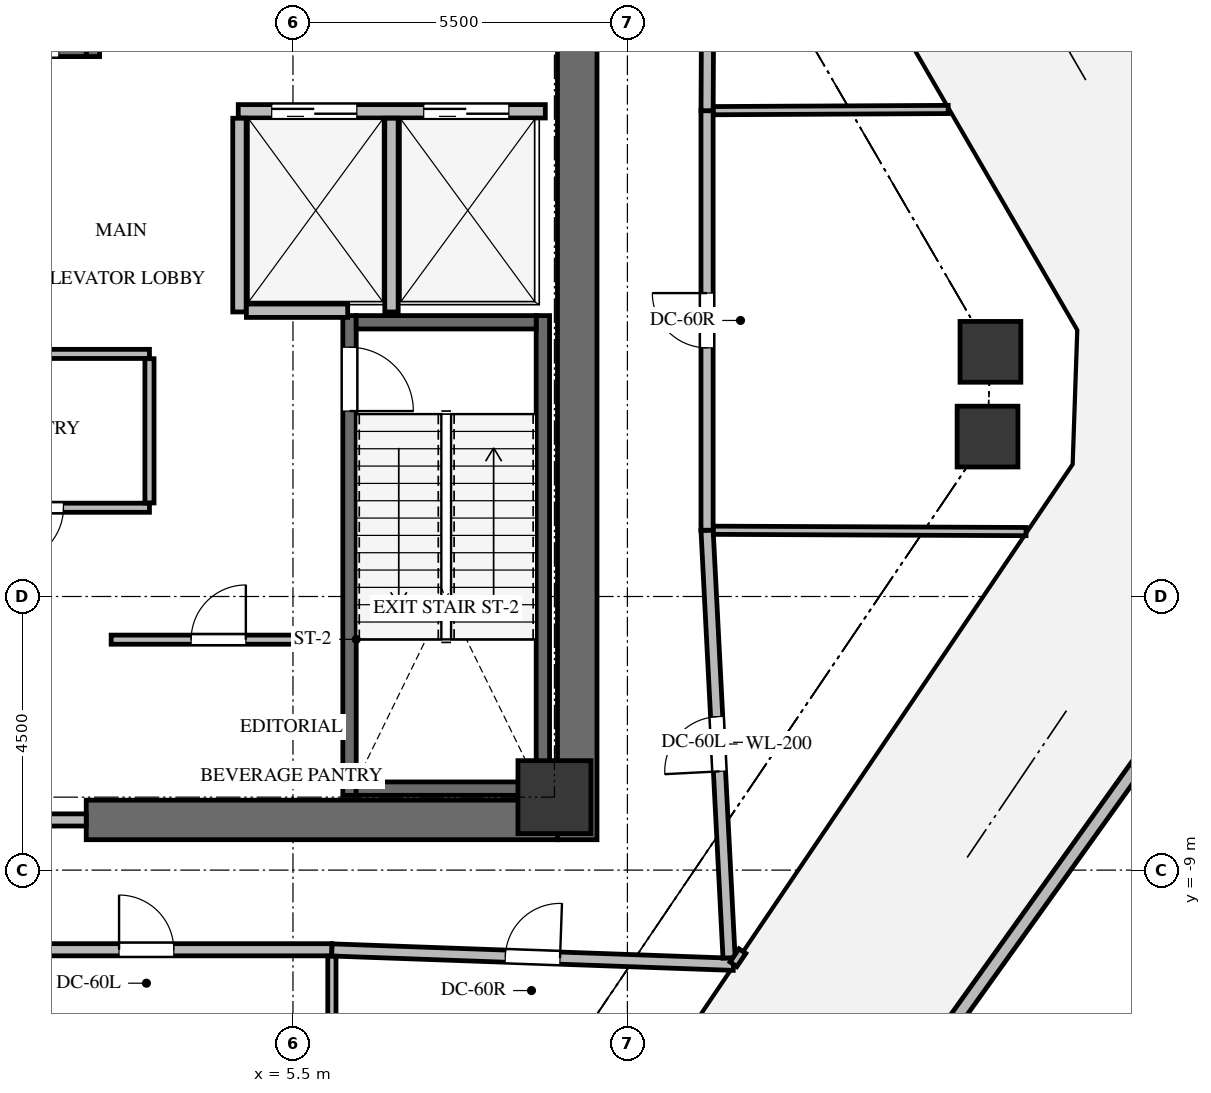
"""IFC4 building model, lengths in metres.
Left out: names, types, materials, properties, quantities, classifications, styles, units other than length and angle.
Written with IfcOpenShell. Run it as: python <this file> out.ifc"""

import sys

from ifc_helpers import new_model, si_unit, direction, frame, frame_2d, origin, origin_2d, place, context, subcontext, project, spatial, rectangle, extrude, source, transform, mapped, element, fill, save


model = new_model("IFC4")
c1 = context("Model", 3, precision=1e-05, world=origin(), true_north=direction((0.0, 1.0)))
c2 = subcontext(c1, "Body", "Model", "MODEL_VIEW")
j1 = project(units=[si_unit("LENGTHUNIT", "METRE"), si_unit("PLANEANGLEUNIT", "RADIAN")], contexts=[c1])
p1 = place(None, origin())
s1 = spatial("IfcSite", under=j1, at=p1, CompositionType="ELEMENT")
p2 = place(p1, origin())
s2 = spatial("IfcBuilding", under=s1, at=p2, CompositionType="ELEMENT")
p3 = place(p2, frame((0.0, 0.0, 213.4)))
s3 = spatial("IfcBuildingStorey", under=s2, at=p3, CompositionType="ELEMENT", Elevation=213.4)
p4 = place(p3, frame((10.175, -8.5, 0.0), z_axis=(0.0, 0.0, 1.0), x_axis=(0.0, 1.0, 0.0)))
e1 = element("IfcWall", 1, at=p4, inside=s3, PredefinedType="SHEAR", context=c2, shape_type="SweptSolid", body=[
    extrude(rectangle(XDim=17.0, YDim=0.65, at=frame_2d((8.5, 0.0))), origin(), (0.0, 0.0, 1.0), 4.9),
])
p5 = place(p3, frame((2.1, -8.175, 0.0), z_axis=(0.0, 0.0, 1.0), x_axis=(1.0, 0.0, 0.0)))
e2 = element("IfcWall", 2, at=p5, inside=s3, PredefinedType="SHEAR", context=c2, shape_type="SweptSolid", body=[
    extrude(rectangle(XDim=7.75, YDim=0.65, at=frame_2d((3.875, 0.0))), origin(), (0.0, 0.0, 1.0), 4.9),
])
p6 = place(p3, frame((9.61, -7.77, -0.3), z_axis=(0.0, 0.0, 1.0), x_axis=(0.0, 1.0, 0.0)))
e3 = element("IfcWall", 3, at=p6, inside=s3, PredefinedType="SHEAR", context=c2, shape_type="SweptSolid", body=[
    extrude(rectangle(XDim=7.89, YDim=0.22, at=frame_2d((3.945, 0.0))), origin(), (0.0, 0.0, 1.0), 4.96),
])
p7 = place(p3, frame((6.43, 0.12, -0.3), z_axis=(0.0, 0.0, 1.0), x_axis=(0.0, -1.0, 0.0)))
e4 = element("IfcWall", 4, at=p7, inside=s3, PredefinedType="SHEAR", context=c2, shape_type="SweptSolid", body=[
    extrude(rectangle(XDim=7.89, YDim=0.22, at=frame_2d((3.945, 0.0))), origin(), (0.0, 0.0, 1.0), 4.96),
])
p8 = place(p7, frame((0.52, 0.0, 0.0)))
e5 = element("IfcOpeningElement", 5, at=p8, cuts=e4, PredefinedType="OPENING", context=c2, shape_type="SweptSolid", body=[
    extrude(rectangle(XDim=1.05, YDim=2.15, at=frame_2d((0.525, 1.075))), frame((0.0, 0.12, 0.0), z_axis=(0.0, -1.0, 0.0), x_axis=(1.0, 0.0, 0.0)), (0.0, 0.0, 1.0), 0.24),
])
for number, where, z_axis, x_axis in (
    (6, (6.54, -7.66, -0.3), (0.0, 0.0, 1.0), (1.0, 0.0, 0.0)),
    (7, (9.5, 0.01, -0.3), (0.0, 0.0, 1.0), (-1.0, 0.0, 0.0)),
):
    element("IfcWall", number, at=place(p3, frame(where, z_axis=z_axis, x_axis=x_axis)), inside=s3, PredefinedType="SHEAR", context=c2, shape_type="SweptSolid", body=[
        extrude(rectangle(XDim=2.96, YDim=0.22, at=frame_2d((1.48, 0.0))), origin(), (0.0, 0.0, 1.0), 4.96),
    ])
p9 = place(p3, frame((2.21, 4.38, -0.3), z_axis=(0.0, 0.0, 1.0), x_axis=(0.0, 1.0, 0.0)))
e8 = element("IfcWall", 8, at=p9, inside=s3, PredefinedType="SHEAR", context=c2, shape_type="SweptSolid", body=[
    extrude(rectangle(XDim=3.4, YDim=0.22, at=frame_2d((1.7, 0.0))), origin(), (0.0, 0.0, 1.0), 4.96),
])
p10 = place(p3, frame((-5.25, 4.49, -0.3), z_axis=(0.0, 0.0, 1.0), x_axis=(1.0, 0.0, 0.0)))
e9 = element("IfcWall", 9, at=p10, inside=s3, PredefinedType="SHEAR", context=c2, shape_type="SweptSolid", body=[
    extrude(rectangle(XDim=7.35, YDim=0.22, at=frame_2d((3.675, 0.0))), origin(), (0.0, 0.0, 1.0), 4.96),
])
p11 = place(p10, frame((5.85, 0.0, 0.0)))
e10 = element("IfcOpeningElement", 10, at=p11, cuts=e9, PredefinedType="OPENING", context=c2, shape_type="SweptSolid", body=[
    extrude(rectangle(XDim=1.05, YDim=2.15, at=frame_2d((0.525, 1.075))), frame((0.0, 0.12, 0.0), z_axis=(0.0, -1.0, 0.0), x_axis=(1.0, 0.0, 0.0)), (0.0, 0.0, 1.0), 0.24),
])
m1 = source(origin(), c2, "Body", "SweptSolid", [
    extrude(rectangle(XDim=1.2, YDim=1.2, at=origin_2d()), origin(), (0.0, 0.0, 1.0), 4.96),
])
p12 = place(p3, frame((9.8, -7.8, -0.3), z_axis=(0.0, 0.0, 1.0), x_axis=(1.0, 0.0, 0.0)))
e11 = element("IfcColumn", 11, at=p12, inside=s3, PredefinedType="COLUMN", context=c2, shape_type="MappedRepresentation", body=[
    mapped(m1, transform((0.0, 0.0, 0.0), x_axis=(1.0, 0.0, 0.0), y_axis=(0.0, 1.0, 0.0), z_axis=(0.0, 0.0, 1.0), scale=1.0)),
])
m2 = source(origin(), c2, "Body", "SweptSolid", [
    extrude(rectangle(XDim=1.0, YDim=1.0, at=origin_2d()), origin(), (0.0, 0.0, 1.0), 4.96),
])
for number, where, z_axis, x_axis in (
    (12, (16.97, -0.476, -0.3), (0.0, 0.0, 1.0), (1.0, 0.0, 0.0)),
    (13, (16.922, -1.87, -0.3), (0.0, 0.0, 1.0), (1.0, 0.0, 0.0)),
):
    element("IfcColumn", number, at=place(p3, frame(where, z_axis=z_axis, x_axis=x_axis)), inside=s3, PredefinedType="COLUMN", context=c2, shape_type="MappedRepresentation", body=[
        mapped(m2, transform((0.0, 0.0, 0.0), x_axis=(1.0, 0.0, 0.0), y_axis=(0.0, 1.0, 0.0), z_axis=(0.0, 0.0, 1.0), scale=1.0)),
    ])
p13 = place(p3, frame((13.512, 15.216, 0.0), z_axis=(0.0, 0.0, 1.0), x_axis=(0.52569294399, -0.85067439637, 0.0)))
e14 = element("IfcWall", 14, at=p13, inside=s3, PredefinedType="PARAPET", context=c2, shape_type="SweptSolid", body=[
    extrude(rectangle(XDim=18.029, YDim=0.22, at=frame_2d((9.015, 0.0))), origin(), (0.0, 0.0, 1.0), 1.2),
])
p14 = place(p3, frame((22.914, -2.353, 0.0), z_axis=(0.0, 0.0, 1.0), x_axis=(-0.582134397548, -0.813092579718, 0.0)))
e15 = element("IfcWall", 15, at=p14, inside=s3, PredefinedType="PARAPET", context=c2, shape_type="SweptSolid", body=[
    extrude(rectangle(XDim=17.774, YDim=0.22, at=frame_2d((8.887, 0.0))), origin(), (0.0, 0.0, 1.0), 1.2),
])
p15 = place(p3, frame((-2.1, -8.175, 0.0), z_axis=(0.0, 0.0, 1.0), x_axis=(1.0, 0.0, 0.0)))
e16 = element("IfcWall", 16, at=p15, inside=s3, PredefinedType="SOLIDWALL", context=c2, shape_type="SweptSolid", body=[
    extrude(rectangle(XDim=4.2, YDim=0.2, at=frame_2d((2.1, 0.0))), origin(), (0.0, 0.0, 1.0), 4.645),
])
p16 = place(p15, frame((1.2, 0.0, 0.0)))
e17 = element("IfcOpeningElement", 17, at=p16, cuts=e16, PredefinedType="OPENING", context=c2, shape_type="SweptSolid", body=[
    extrude(rectangle(XDim=1.8, YDim=2.15, at=frame_2d((0.9, 1.075))), frame((0.0, 0.11, 0.0), z_axis=(0.0, -1.0, 0.0), x_axis=(1.0, 0.0, 0.0)), (0.0, 0.0, 1.0), 0.22),
])
p17 = place(p3, frame((4.6, 3.48, 0.0), z_axis=(0.0, 0.0, 1.0), x_axis=(1.0, 0.0, 0.0)))
e18 = element("IfcWall", 18, at=p17, inside=s3, PredefinedType="SOLIDWALL", context=c2, shape_type="SweptSolid", body=[
    extrude(rectangle(XDim=5.05, YDim=0.22, at=frame_2d((2.525, 0.0))), origin(), (0.0, 0.0, 1.0), 4.645),
])
p18 = place(p17, frame((0.55, 0.0, 0.0)))
e19 = element("IfcOpeningElement", 19, at=p18, cuts=e18, PredefinedType="OPENING", context=c2, shape_type="SweptSolid", body=[
    extrude(rectangle(XDim=1.4, YDim=2.15, at=frame_2d((0.7, 1.075))), frame((0.0, 0.12, 0.0), z_axis=(0.0, -1.0, 0.0), x_axis=(1.0, 0.0, 0.0)), (0.0, 0.0, 1.0), 0.24),
])
p19 = place(p17, frame((3.05, 0.0, 0.0)))
e20 = element("IfcOpeningElement", 20, at=p19, cuts=e18, PredefinedType="OPENING", context=c2, shape_type="SweptSolid", body=[
    extrude(rectangle(XDim=1.4, YDim=2.15, at=frame_2d((0.7, 1.075))), frame((0.0, 0.12, 0.0), z_axis=(0.0, -1.0, 0.0), x_axis=(1.0, 0.0, 0.0)), (0.0, 0.0, 1.0), 0.24),
])
for number, where, z_axis, x_axis in (
    (21, (4.62, 0.18, 0.0), (0.0, 0.0, 1.0), (0.0, 1.0, 0.0)),
    (22, (7.12, 0.18, 0.0), (0.0, 0.0, 1.0), (0.0, 1.0, 0.0)),
):
    element("IfcWall", number, at=place(p3, frame(where, z_axis=z_axis, x_axis=x_axis)), inside=s3, PredefinedType="SOLIDWALL", context=c2, shape_type="SweptSolid", body=[
        extrude(rectangle(XDim=3.186, YDim=0.22, at=frame_2d((1.593, 0.0))), origin(), (0.0, 0.0, 1.0), 4.645),
    ])
p20 = place(p3, frame((4.734, 0.2, 0.0), z_axis=(0.0, 0.0, 1.0), x_axis=(1.0, 0.0, 0.0)))
e23 = element("IfcWall", 23, at=p20, inside=s3, PredefinedType="SOLIDWALL", context=c2, shape_type="SweptSolid", body=[
    extrude(rectangle(XDim=1.666, YDim=0.22, at=frame_2d((0.833, 0.0))), origin(), (0.0, 0.0, 1.0), 4.645),
])
p21 = place(p3, frame((2.51, -5.21, 0.0), z_axis=(0.0, 0.0, 1.0), x_axis=(1.0, 0.0, 0.0)))
e24 = element("IfcWall", 24, at=p21, inside=s3, PredefinedType="PARTITIONING", context=c2, shape_type="SweptSolid", body=[
    extrude(rectangle(XDim=3.53, YDim=0.15, at=frame_2d((1.765, 0.0))), origin(), (0.0, 0.0, 1.0), 4.645),
])
p22 = place(p21, frame((1.315, 0.0, 0.0)))
e25 = element("IfcOpeningElement", 25, at=p22, cuts=e24, PredefinedType="OPENING", context=c2, shape_type="SweptSolid", body=[
    extrude(rectangle(XDim=0.9, YDim=2.05, at=frame_2d((0.45, 1.025))), frame((0.0, 0.085, 0.0), z_axis=(0.0, -1.0, 0.0), x_axis=(1.0, 0.0, 0.0)), (0.0, 0.0, 1.0), 0.17),
])
p23 = place(p3, frame((3.14, -3.04, 0.0), z_axis=(0.0, 0.0, 1.0), x_axis=(-1.0, 0.0, 0.0)))
e26 = element("IfcWall", 26, at=p23, inside=s3, PredefinedType="PARTITIONING", context=c2, shape_type="SweptSolid", body=[
    extrude(rectangle(XDim=3.73, YDim=0.15, at=frame_2d((1.865, 0.0))), origin(), (0.0, 0.0, 1.0), 4.645),
])
p24 = place(p23, frame((1.415, 0.0, 0.0)))
e27 = element("IfcOpeningElement", 27, at=p24, cuts=e26, PredefinedType="OPENING", context=c2, shape_type="SweptSolid", body=[
    extrude(rectangle(XDim=0.9, YDim=2.05, at=frame_2d((0.45, 1.025))), frame((0.0, 0.085, 0.0), z_axis=(0.0, -1.0, 0.0), x_axis=(1.0, 0.0, 0.0)), (0.0, 0.0, 1.0), 0.17),
])
p25 = place(p3, frame((-0.59, -0.51, 0.0), z_axis=(0.0, 0.0, 1.0), x_axis=(1.0, 0.0, 0.0)))
e28 = element("IfcWall", 28, at=p25, inside=s3, PredefinedType="PARTITIONING", context=c2, shape_type="SweptSolid", body=[
    extrude(rectangle(XDim=3.73, YDim=0.15, at=frame_2d((1.865, 0.0))), origin(), (0.0, 0.0, 1.0), 4.645),
])
p26 = place(p3, frame((3.14, -0.589, 0.0), z_axis=(0.0, 0.0, 1.0), x_axis=(0.0, -1.0, 0.0)))
e29 = element("IfcWall", 29, at=p26, inside=s3, PredefinedType="PARTITIONING", context=c2, shape_type="SweptSolid", body=[
    extrude(rectangle(XDim=2.372, YDim=0.15, at=frame_2d((1.186, 0.0))), origin(), (0.0, 0.0, 1.0), 4.645),
])
p27 = place(p3, frame((0.04, -10.31, 0.0), z_axis=(0.0, 0.0, 1.0), x_axis=(1.0, 0.0, 0.0)))
e30 = element("IfcWall", 30, at=p27, inside=s3, PredefinedType="SOLIDWALL", context=c2, shape_type="SweptSolid", body=[
    extrude(rectangle(XDim=6.1, YDim=0.2, at=frame_2d((3.05, 0.0))), origin(), (0.0, 0.0, 1.0), 3.901),
])
p28 = place(p27, frame((2.6, 0.0, 0.0)))
e31 = element("IfcOpeningElement", 31, at=p28, cuts=e30, PredefinedType="OPENING", context=c2, shape_type="SweptSolid", body=[
    extrude(rectangle(XDim=0.9, YDim=2.05, at=frame_2d((0.45, 1.025))), frame((0.0, 0.11, 0.0), z_axis=(0.0, -1.0, 0.0), x_axis=(1.0, 0.0, 0.0)), (0.0, 0.0, 1.0), 0.22),
])
p29 = place(p3, frame((6.14, -10.313, 0.0), z_axis=(0.0, 0.0, 1.0), x_axis=(0.999359083983, -0.035796944861, 0.0)))
e32 = element("IfcWall", 32, at=p29, inside=s3, PredefinedType="SOLIDWALL", context=c2, shape_type="SweptSolid", body=[
    extrude(rectangle(XDim=6.609, YDim=0.2, at=frame_2d((3.304, 0.0))), origin(), (0.0, 0.0, 1.0), 3.999),
])
p30 = place(p29, frame((2.854, 0.0, 0.0)))
e33 = element("IfcOpeningElement", 33, at=p30, cuts=e32, PredefinedType="OPENING", context=c2, shape_type="SweptSolid", body=[
    extrude(rectangle(XDim=0.9, YDim=2.05, at=frame_2d((0.45, 1.025))), frame((0.0, 0.11, 0.0), z_axis=(0.0, -1.0, 0.0), x_axis=(1.0, 0.0, 0.0)), (0.0, 0.0, 1.0), 0.22),
])
p31 = place(p3, frame((12.672, -10.443, 0.0), z_axis=(0.0, 0.0, 1.0), x_axis=(-0.051412460162, 0.998677504974, 0.0)))
e34 = element("IfcWall", 34, at=p31, inside=s3, PredefinedType="SOLIDWALL", context=c2, shape_type="SweptSolid", body=[
    extrude(rectangle(XDim=7.042, YDim=0.2, at=frame_2d((3.521, 0.0))), origin(), (0.0, 0.0, 1.0), 3.999),
])
p32 = place(p31, frame((3.071, 0.0, 0.0)))
e35 = element("IfcOpeningElement", 35, at=p32, cuts=e34, PredefinedType="OPENING", context=c2, shape_type="SweptSolid", body=[
    extrude(rectangle(XDim=0.9, YDim=2.05, at=frame_2d((0.45, 1.025))), frame((0.0, 0.11, 0.0), z_axis=(0.0, -1.0, 0.0), x_axis=(1.0, 0.0, 0.0)), (0.0, 0.0, 1.0), 0.22),
])
p33 = place(p3, frame((12.31, -3.41, 0.0), z_axis=(0.0, 0.0, 1.0), x_axis=(0.0, 1.0, 0.0)))
e36 = element("IfcWall", 36, at=p33, inside=s3, PredefinedType="SOLIDWALL", context=c2, shape_type="SweptSolid", body=[
    extrude(rectangle(XDim=6.9, YDim=0.2, at=frame_2d((3.45, 0.0))), origin(), (0.0, 0.0, 1.0), 3.901),
])
p34 = place(p33, frame((3.0, 0.0, 0.0)))
e37 = element("IfcOpeningElement", 37, at=p34, cuts=e36, PredefinedType="OPENING", context=c2, shape_type="SweptSolid", body=[
    extrude(rectangle(XDim=0.9, YDim=2.05, at=frame_2d((0.45, 1.025))), frame((0.0, 0.11, 0.0), z_axis=(0.0, -1.0, 0.0), x_axis=(1.0, 0.0, 0.0)), (0.0, 0.0, 1.0), 0.22),
])
p35 = place(p3, frame((12.31, 3.49, 0.0), z_axis=(0.0, 0.0, 1.0), x_axis=(0.005031021246, 0.999987344333, 0.0)))
e38 = element("IfcWall", 38, at=p35, inside=s3, PredefinedType="SOLIDWALL", context=c2, shape_type="SweptSolid", body=[
    extrude(rectangle(XDim=6.794, YDim=0.2, at=frame_2d((3.397, 0.0))), origin(), (0.0, 0.0, 1.0), 3.999),
])
p36 = place(p35, frame((2.947, 0.0, 0.0)))
e39 = element("IfcOpeningElement", 39, at=p36, cuts=e38, PredefinedType="OPENING", context=c2, shape_type="SweptSolid", body=[
    extrude(rectangle(XDim=0.9, YDim=2.05, at=frame_2d((0.45, 1.025))), frame((0.0, 0.11, 0.0), z_axis=(0.0, -1.0, 0.0), x_axis=(1.0, 0.0, 0.0)), (0.0, 0.0, 1.0), 0.22),
])
p37 = place(p3, frame((6.14, -10.417, 0.0), z_axis=(0.0, 0.0, 1.0), x_axis=(0.0, -1.0, 0.0)))
e40 = element("IfcWall", 40, at=p37, inside=s3, PredefinedType="PARTITIONING", context=c2, shape_type="SweptSolid", body=[
    extrude(rectangle(XDim=6.769, YDim=0.135, at=frame_2d((3.385, 0.0))), origin(), (0.0, 0.0, 1.0), 3.901),
])
p38 = place(p3, frame((12.744, -10.55, 0.0), z_axis=(0.0, 0.0, 1.0), x_axis=(0.56006489544, 0.828448738846, 0.0)))
e41 = element("IfcWall", 41, at=p38, inside=s3, PredefinedType="PARTITIONING", context=c2, shape_type="SweptSolid", body=[
    extrude(rectangle(XDim=0.262, YDim=0.135, at=frame_2d((0.131, 0.0))), origin(), (0.0, 0.0, 1.0), 4.645),
])
p39 = place(p3, frame((12.414, -3.41, 0.0), z_axis=(0.0, 0.0, 1.0), x_axis=(0.999990868706, -0.004273465251, 0.0)))
e42 = element("IfcWall", 42, at=p39, inside=s3, PredefinedType="PARTITIONING", context=c2, shape_type="SweptSolid", body=[
    extrude(rectangle(XDim=5.142, YDim=0.135, at=frame_2d((2.571, 0.0))), origin(), (0.0, 0.0, 1.0), 3.999),
])
p40 = place(p3, frame((12.414, 3.49, 0.0), z_axis=(0.0, 0.0, 1.0), x_axis=(0.999987207709, 0.005058104237, 0.0)))
e43 = element("IfcWall", 43, at=p40, inside=s3, PredefinedType="PARTITIONING", context=c2, shape_type="SweptSolid", body=[
    extrude(rectangle(XDim=3.861, YDim=0.135, at=frame_2d((1.931, 0.0))), origin(), (0.0, 0.0, 1.0), 3.999),
])
p41 = place(p3, frame((0.0, 0.0, -0.28)))
p42 = place(p41, frame((19.883, -3.297, -0.01)))
p43 = place(p42, frame((0.0, 0.0, 0.24)))
e44 = element("IfcWindow", 44, at=p43, inside=s3, PartitioningType="SINGLE_PANEL", PredefinedType="SKYLIGHT", context=c2, shape_type="SweptSolid", body=[
    extrude(rectangle(XDim=1.2, YDim=1.2, at=origin_2d()), origin(), (0.0, 0.0, 1.0), 0.05),
])
m3 = source(origin(), c2, "Body", "SweptSolid", [
    extrude(rectangle(XDim=1.05, YDim=2.15, at=frame_2d((0.525, 1.075))), frame((0.0, 0.025, 0.0), z_axis=(0.0, -1.0, 0.0), x_axis=(1.0, 0.0, 0.0)), (0.0, 0.0, 1.0), 0.05),
])
p44 = place(p8, origin())
e45 = element("IfcDoor", 45, at=p44, inside=s3, OperationType="SINGLE_SWING_RIGHT", PredefinedType="DOOR", context=c2, shape_type="MappedRepresentation", body=[
    mapped(m3, transform((0.0, 0.0, 0.0), x_axis=(1.0, 0.0, 0.0), y_axis=(0.0, 1.0, 0.0), z_axis=(0.0, 0.0, 1.0), scale=1.0)),
])
fill(e5, e45)
m4 = source(origin(), c2, "Body", "SweptSolid", [
    extrude(rectangle(XDim=1.4, YDim=2.15, at=frame_2d((0.7, 1.075))), frame((0.0, 0.025, 0.0), z_axis=(0.0, -1.0, 0.0), x_axis=(1.0, 0.0, 0.0)), (0.0, 0.0, 1.0), 0.05),
])
p45 = place(p18, origin())
e46 = element("IfcDoor", 46, at=p45, inside=s3, OperationType="DOUBLE_DOOR_SLIDING", PredefinedType="DOOR", context=c2, shape_type="MappedRepresentation", body=[
    mapped(m4, transform((0.0, 0.0, 0.0), x_axis=(1.0, 0.0, 0.0), y_axis=(0.0, 1.0, 0.0), z_axis=(0.0, 0.0, 1.0), scale=1.0)),
])
fill(e19, e46)
p46 = place(p19, origin())
e47 = element("IfcDoor", 47, at=p46, inside=s3, OperationType="DOUBLE_DOOR_SLIDING", PredefinedType="DOOR", context=c2, shape_type="MappedRepresentation", body=[
    mapped(m4, transform((0.0, 0.0, 0.0), x_axis=(1.0, 0.0, 0.0), y_axis=(0.0, 1.0, 0.0), z_axis=(0.0, 0.0, 1.0), scale=1.0)),
])
fill(e20, e47)
m5 = source(origin(), c2, "Body", "SweptSolid", [
    extrude(rectangle(XDim=0.9, YDim=2.05, at=frame_2d((0.45, 1.025))), frame((0.0, 0.025, 0.0), z_axis=(0.0, -1.0, 0.0), x_axis=(1.0, 0.0, 0.0)), (0.0, 0.0, 1.0), 0.05),
])
p47 = place(p22, origin())
e48 = element("IfcDoor", 48, at=p47, inside=s3, OperationType="SINGLE_SWING_RIGHT", PredefinedType="DOOR", context=c2, shape_type="MappedRepresentation", body=[
    mapped(m5, transform((0.0, 0.0, 0.0), x_axis=(1.0, 0.0, 0.0), y_axis=(0.0, 1.0, 0.0), z_axis=(0.0, 0.0, 1.0), scale=1.0)),
])
fill(e25, e48)
p48 = place(p24, origin())
e49 = element("IfcDoor", 49, at=p48, inside=s3, OperationType="SINGLE_SWING_RIGHT", PredefinedType="DOOR", context=c2, shape_type="MappedRepresentation", body=[
    mapped(m5, transform((0.0, 0.0, 0.0), x_axis=(1.0, 0.0, 0.0), y_axis=(0.0, 1.0, 0.0), z_axis=(0.0, 0.0, 1.0), scale=1.0)),
])
fill(e27, e49)
m6 = source(origin(), c2, "Body", "SweptSolid", [
    extrude(rectangle(XDim=0.9, YDim=2.05, at=frame_2d((0.45, 1.025))), frame((0.0, 0.025, 0.0), z_axis=(0.0, -1.0, 0.0), x_axis=(1.0, 0.0, 0.0)), (0.0, 0.0, 1.0), 0.05),
])
p49 = place(p28, origin())
e50 = element("IfcDoor", 50, at=p49, inside=s3, OperationType="SINGLE_SWING_LEFT", PredefinedType="DOOR", context=c2, shape_type="MappedRepresentation", body=[
    mapped(m6, transform((0.0, 0.0, 0.0), x_axis=(1.0, 0.0, 0.0), y_axis=(0.0, 1.0, 0.0), z_axis=(0.0, 0.0, 1.0), scale=1.0)),
])
fill(e31, e50)
p50 = place(p30, origin())
e51 = element("IfcDoor", 51, at=p50, inside=s3, OperationType="SINGLE_SWING_RIGHT", PredefinedType="DOOR", context=c2, shape_type="MappedRepresentation", body=[
    mapped(m5, transform((0.0, 0.0, 0.0), x_axis=(1.0, 0.0, 0.0), y_axis=(0.0, 1.0, 0.0), z_axis=(0.0, 0.0, 1.0), scale=1.0)),
])
fill(e33, e51)
p51 = place(p32, origin())
e52 = element("IfcDoor", 52, at=p51, inside=s3, OperationType="SINGLE_SWING_LEFT", PredefinedType="DOOR", context=c2, shape_type="MappedRepresentation", body=[
    mapped(m6, transform((0.0, 0.0, 0.0), x_axis=(1.0, 0.0, 0.0), y_axis=(0.0, 1.0, 0.0), z_axis=(0.0, 0.0, 1.0), scale=1.0)),
])
fill(e35, e52)
p52 = place(p34, origin())
e53 = element("IfcDoor", 53, at=p52, inside=s3, OperationType="SINGLE_SWING_RIGHT", PredefinedType="DOOR", context=c2, shape_type="MappedRepresentation", body=[
    mapped(m5, transform((0.0, 0.0, 0.0), x_axis=(1.0, 0.0, 0.0), y_axis=(0.0, 1.0, 0.0), z_axis=(0.0, 0.0, 1.0), scale=1.0)),
])
fill(e37, e53)
save(model, sys.argv[1])
